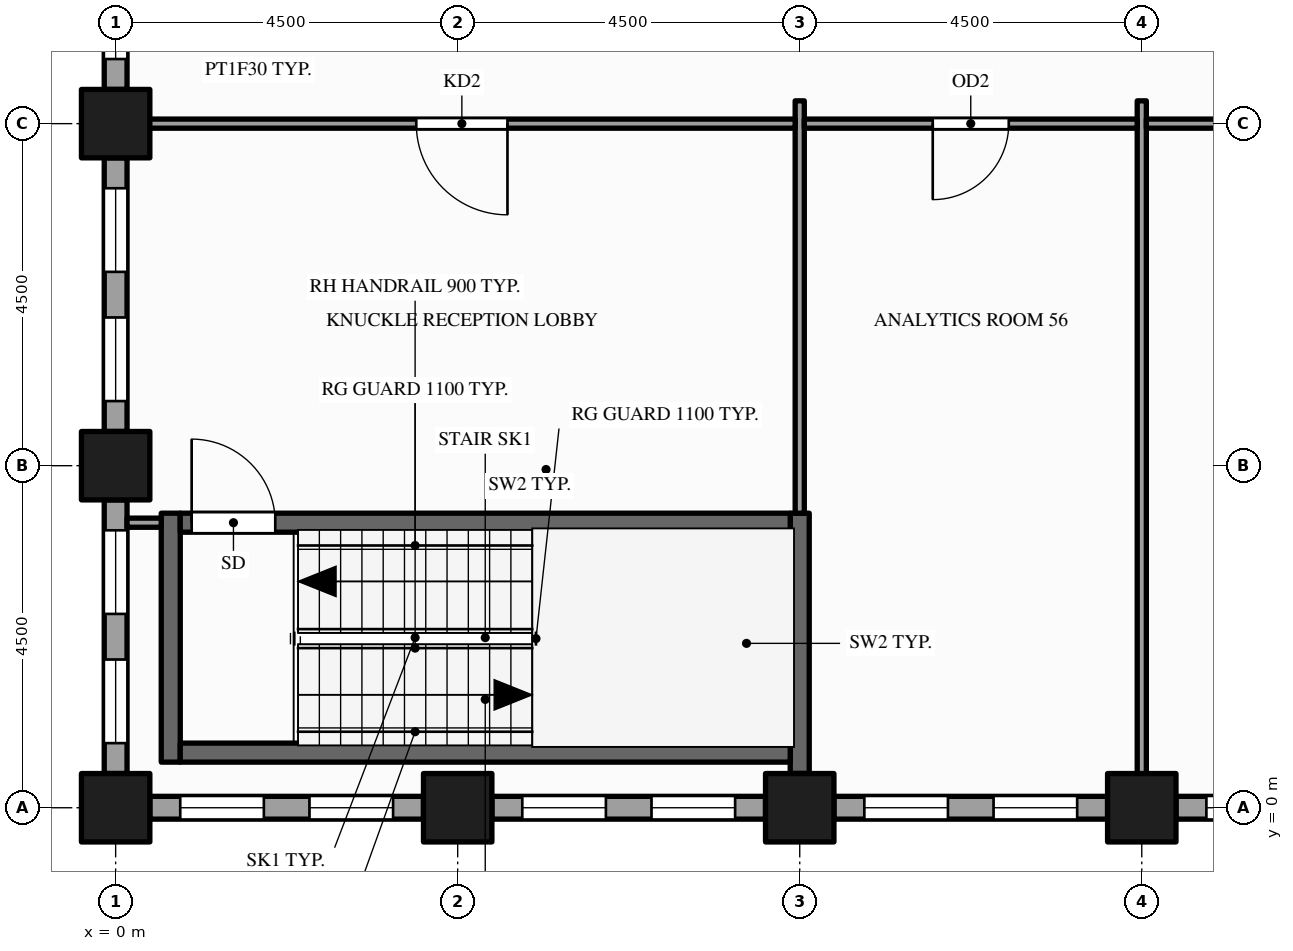
"""IFC4 building model, lengths in metres.
Left out: names, types, materials, properties, quantities, classifications, styles, units other than length and angle.
Written with IfcOpenShell. Run it as: python <this file> out.ifc"""

import sys

from ifc_helpers import new_model, si_unit, direction, frame, frame_2d, origin, origin_2d, place, context, subcontext, project, spatial, rectangle, hollow_rectangle, extrude, element, fill, save


model = new_model("IFC4")
c1 = context("Model", 3, precision=1e-05, world=origin(), true_north=direction((0.0, 1.0)))
c2 = subcontext(c1, "Body", "Model", "MODEL_VIEW")
j1 = project(units=[si_unit("LENGTHUNIT", "METRE"), si_unit("PLANEANGLEUNIT", "RADIAN")], contexts=[c1])
p1 = place(None, origin())
s1 = spatial("IfcSite", under=j1, at=p1, CompositionType="ELEMENT")
p2 = place(p1, origin())
s2 = spatial("IfcBuilding", under=s1, at=p2, CompositionType="ELEMENT")
p3 = place(p2, frame((0.0, 0.0, 147.0)))
s3 = spatial("IfcBuildingStorey", under=s2, at=p3, CompositionType="ELEMENT", Elevation=147.0)
for number, where, z_axis, x_axis in (
    (1, (0.0, 0.0, -0.15), (0.0, 0.0, 1.0), (1.0, 0.0, 0.0)),
    (2, (0.0, 4.5, -0.15), (0.0, 0.0, 1.0), (1.0, 0.0, 0.0)),
    (3, (0.0, 9.0, -0.15), (0.0, 0.0, 1.0), (1.0, 0.0, 0.0)),
    (4, (4.5, 0.0, -0.15), (0.0, 0.0, 1.0), (1.0, 0.0, 0.0)),
    (5, (9.0, 0.0, -0.15), (0.0, 0.0, 1.0), (1.0, 0.0, 0.0)),
    (6, (13.5, 0.0, -0.15), (0.0, 0.0, 1.0), (1.0, 0.0, 0.0)),
):
    element("IfcColumn", number, at=place(p3, frame(where, z_axis=z_axis, x_axis=x_axis)), inside=s3, PredefinedType="COLUMN", context=c2, shape_type="SweptSolid", body=[
        extrude(hollow_rectangle(XDim=0.9, YDim=0.9, WallThickness=0.045, at=origin_2d()), origin(), (0.0, 0.0, 1.0), 4.0),
    ])
p4 = place(p3, frame((0.0, 13.05, 0.0), z_axis=(0.0, 0.0, 1.0), x_axis=(0.0, -1.0, 0.0)))
e7 = element("IfcWall", 7, at=p4, inside=s3, PredefinedType="STANDARD", context=c2, shape_type="SweptSolid", body=[
    extrude(rectangle(XDim=3.6, YDim=0.3, at=frame_2d((1.8, 0.0))), origin(), (0.0, 0.0, 1.0), 3.149),
])
p5 = place(p4, frame((0.4, 0.0, 0.9)))
e8 = element("IfcOpeningElement", 8, at=p5, cuts=e7, PredefinedType="OPENING", context=c2, shape_type="SweptSolid", body=[
    extrude(rectangle(XDim=1.1, YDim=2.0, at=frame_2d((0.55, 1.0))), frame((0.0, 0.16, 0.0), z_axis=(0.0, -1.0, 0.0), x_axis=(1.0, 0.0, 0.0)), (0.0, 0.0, 1.0), 0.32),
])
p6 = place(p4, frame((2.1, 0.0, 0.9)))
e9 = element("IfcOpeningElement", 9, at=p6, cuts=e7, PredefinedType="OPENING", context=c2, shape_type="SweptSolid", body=[
    extrude(rectangle(XDim=1.1, YDim=2.0, at=frame_2d((0.55, 1.0))), frame((0.0, 0.16, 0.0), z_axis=(0.0, -1.0, 0.0), x_axis=(1.0, 0.0, 0.0)), (0.0, 0.0, 1.0), 0.32),
])
p7 = place(p3, frame((0.0, 8.55, 0.0), z_axis=(0.0, 0.0, 1.0), x_axis=(0.0, -1.0, 0.0)))
e10 = element("IfcWall", 10, at=p7, inside=s3, PredefinedType="STANDARD", context=c2, shape_type="SweptSolid", body=[
    extrude(rectangle(XDim=3.6, YDim=0.3, at=frame_2d((1.8, 0.0))), origin(), (0.0, 0.0, 1.0), 3.149),
])
p8 = place(p7, frame((0.4, 0.0, 0.9)))
e11 = element("IfcOpeningElement", 11, at=p8, cuts=e10, PredefinedType="OPENING", context=c2, shape_type="SweptSolid", body=[
    extrude(rectangle(XDim=1.1, YDim=2.0, at=frame_2d((0.55, 1.0))), frame((0.0, 0.16, 0.0), z_axis=(0.0, -1.0, 0.0), x_axis=(1.0, 0.0, 0.0)), (0.0, 0.0, 1.0), 0.32),
])
p9 = place(p7, frame((2.1, 0.0, 0.9)))
e12 = element("IfcOpeningElement", 12, at=p9, cuts=e10, PredefinedType="OPENING", context=c2, shape_type="SweptSolid", body=[
    extrude(rectangle(XDim=1.1, YDim=2.0, at=frame_2d((0.55, 1.0))), frame((0.0, 0.16, 0.0), z_axis=(0.0, -1.0, 0.0), x_axis=(1.0, 0.0, 0.0)), (0.0, 0.0, 1.0), 0.32),
])
p10 = place(p3, frame((0.0, 4.05, 0.0), z_axis=(0.0, 0.0, 1.0), x_axis=(0.0, -1.0, 0.0)))
e13 = element("IfcWall", 13, at=p10, inside=s3, PredefinedType="STANDARD", context=c2, shape_type="SweptSolid", body=[
    extrude(rectangle(XDim=3.6, YDim=0.3, at=frame_2d((1.8, 0.0))), origin(), (0.0, 0.0, 1.0), 3.149),
])
p11 = place(p10, frame((0.4, 0.0, 0.9)))
e14 = element("IfcOpeningElement", 14, at=p11, cuts=e13, PredefinedType="OPENING", context=c2, shape_type="SweptSolid", body=[
    extrude(rectangle(XDim=1.1, YDim=2.0, at=frame_2d((0.55, 1.0))), frame((0.0, 0.16, 0.0), z_axis=(0.0, -1.0, 0.0), x_axis=(1.0, 0.0, 0.0)), (0.0, 0.0, 1.0), 0.32),
])
p12 = place(p10, frame((2.1, 0.0, 0.9)))
e15 = element("IfcOpeningElement", 15, at=p12, cuts=e13, PredefinedType="OPENING", context=c2, shape_type="SweptSolid", body=[
    extrude(rectangle(XDim=1.1, YDim=2.0, at=frame_2d((0.55, 1.0))), frame((0.0, 0.16, 0.0), z_axis=(0.0, -1.0, 0.0), x_axis=(1.0, 0.0, 0.0)), (0.0, 0.0, 1.0), 0.32),
])
p13 = place(p3, frame((0.45, 0.0, 0.0), z_axis=(0.0, 0.0, 1.0), x_axis=(1.0, 0.0, 0.0)))
e16 = element("IfcWall", 16, at=p13, inside=s3, PredefinedType="STANDARD", context=c2, shape_type="SweptSolid", body=[
    extrude(rectangle(XDim=3.6, YDim=0.3, at=frame_2d((1.8, 0.0))), origin(), (0.0, 0.0, 1.0), 3.149),
])
p14 = place(p13, frame((0.4, 0.0, 0.9)))
e17 = element("IfcOpeningElement", 17, at=p14, cuts=e16, PredefinedType="OPENING", context=c2, shape_type="SweptSolid", body=[
    extrude(rectangle(XDim=1.1, YDim=2.0, at=frame_2d((0.55, 1.0))), frame((0.0, 0.16, 0.0), z_axis=(0.0, -1.0, 0.0), x_axis=(1.0, 0.0, 0.0)), (0.0, 0.0, 1.0), 0.32),
])
p15 = place(p13, frame((2.1, 0.0, 0.9)))
e18 = element("IfcOpeningElement", 18, at=p15, cuts=e16, PredefinedType="OPENING", context=c2, shape_type="SweptSolid", body=[
    extrude(rectangle(XDim=1.1, YDim=2.0, at=frame_2d((0.55, 1.0))), frame((0.0, 0.16, 0.0), z_axis=(0.0, -1.0, 0.0), x_axis=(1.0, 0.0, 0.0)), (0.0, 0.0, 1.0), 0.32),
])
p16 = place(p3, frame((4.95, 0.0, 0.0), z_axis=(0.0, 0.0, 1.0), x_axis=(1.0, 0.0, 0.0)))
e19 = element("IfcWall", 19, at=p16, inside=s3, PredefinedType="STANDARD", context=c2, shape_type="SweptSolid", body=[
    extrude(rectangle(XDim=3.6, YDim=0.3, at=frame_2d((1.8, 0.0))), origin(), (0.0, 0.0, 1.0), 3.149),
])
p17 = place(p16, frame((0.4, 0.0, 0.9)))
e20 = element("IfcOpeningElement", 20, at=p17, cuts=e19, PredefinedType="OPENING", context=c2, shape_type="SweptSolid", body=[
    extrude(rectangle(XDim=1.1, YDim=2.0, at=frame_2d((0.55, 1.0))), frame((0.0, 0.16, 0.0), z_axis=(0.0, -1.0, 0.0), x_axis=(1.0, 0.0, 0.0)), (0.0, 0.0, 1.0), 0.32),
])
p18 = place(p16, frame((2.1, 0.0, 0.9)))
e21 = element("IfcOpeningElement", 21, at=p18, cuts=e19, PredefinedType="OPENING", context=c2, shape_type="SweptSolid", body=[
    extrude(rectangle(XDim=1.1, YDim=2.0, at=frame_2d((0.55, 1.0))), frame((0.0, 0.16, 0.0), z_axis=(0.0, -1.0, 0.0), x_axis=(1.0, 0.0, 0.0)), (0.0, 0.0, 1.0), 0.32),
])
p19 = place(p3, frame((9.45, 0.0, 0.0), z_axis=(0.0, 0.0, 1.0), x_axis=(1.0, 0.0, 0.0)))
e22 = element("IfcWall", 22, at=p19, inside=s3, PredefinedType="STANDARD", context=c2, shape_type="SweptSolid", body=[
    extrude(rectangle(XDim=3.6, YDim=0.3, at=frame_2d((1.8, 0.0))), origin(), (0.0, 0.0, 1.0), 2.87),
])
p20 = place(p19, frame((0.4, 0.0, 0.9)))
e23 = element("IfcOpeningElement", 23, at=p20, cuts=e22, PredefinedType="OPENING", context=c2, shape_type="SweptSolid", body=[
    extrude(rectangle(XDim=1.1, YDim=1.75, at=frame_2d((0.55, 0.875))), frame((0.0, 0.16, 0.0), z_axis=(0.0, -1.0, 0.0), x_axis=(1.0, 0.0, 0.0)), (0.0, 0.0, 1.0), 0.32),
])
p21 = place(p19, frame((2.1, 0.0, 0.9)))
e24 = element("IfcOpeningElement", 24, at=p21, cuts=e22, PredefinedType="OPENING", context=c2, shape_type="SweptSolid", body=[
    extrude(rectangle(XDim=1.1, YDim=1.75, at=frame_2d((0.55, 0.875))), frame((0.0, 0.16, 0.0), z_axis=(0.0, -1.0, 0.0), x_axis=(1.0, 0.0, 0.0)), (0.0, 0.0, 1.0), 0.32),
])
p22 = place(p3, frame((13.95, 0.0, 0.0), z_axis=(0.0, 0.0, 1.0), x_axis=(1.0, 0.0, 0.0)))
e25 = element("IfcWall", 25, at=p22, inside=s3, PredefinedType="STANDARD", context=c2, shape_type="SweptSolid", body=[
    extrude(rectangle(XDim=3.6, YDim=0.3, at=frame_2d((1.8, 0.0))), origin(), (0.0, 0.0, 1.0), 2.87),
])
p23 = place(p22, frame((0.4, 0.0, 0.9)))
e26 = element("IfcOpeningElement", 26, at=p23, cuts=e25, PredefinedType="OPENING", context=c2, shape_type="SweptSolid", body=[
    extrude(rectangle(XDim=1.1, YDim=1.75, at=frame_2d((0.55, 0.875))), frame((0.0, 0.16, 0.0), z_axis=(0.0, -1.0, 0.0), x_axis=(1.0, 0.0, 0.0)), (0.0, 0.0, 1.0), 0.32),
])
p24 = place(p22, frame((2.1, 0.0, 0.9)))
e27 = element("IfcOpeningElement", 27, at=p24, cuts=e25, PredefinedType="OPENING", context=c2, shape_type="SweptSolid", body=[
    extrude(rectangle(XDim=1.1, YDim=1.75, at=frame_2d((0.55, 0.875))), frame((0.0, 0.16, 0.0), z_axis=(0.0, -1.0, 0.0), x_axis=(1.0, 0.0, 0.0)), (0.0, 0.0, 1.0), 0.32),
])
p25 = place(p3, frame((0.725, 0.6, 0.0), z_axis=(0.0, 0.0, 1.0), x_axis=(0.0, 1.0, 0.0)))
e28 = element("IfcWall", 28, at=p25, inside=s3, PredefinedType="SHEAR", context=c2, shape_type="SweptSolid", body=[
    extrude(rectangle(XDim=3.275, YDim=0.25, at=frame_2d((1.637, 0.0))), origin(), (0.0, 0.0, 1.0), 3.85),
])
p26 = place(p3, frame((9.0, 0.15, 0.0), z_axis=(0.0, 0.0, 1.0), x_axis=(0.0, 1.0, 0.0)))
e29 = element("IfcWall", 29, at=p26, inside=s3, PredefinedType="PARTITIONING", context=c2, shape_type="SweptSolid", body=[
    extrude(rectangle(XDim=0.3, YDim=0.12, at=frame_2d((0.15, 0.0))), origin(), (0.0, 0.0, 1.0), 3.85),
])
p27 = place(p3, frame((9.0, 0.45, 0.0), z_axis=(0.0, 0.0, 1.0), x_axis=(0.0, 1.0, 0.0)))
e30 = element("IfcWall", 30, at=p27, inside=s3, PredefinedType="SHEAR", context=c2, shape_type="SweptSolid", body=[
    extrude(rectangle(XDim=3.425, YDim=0.25, at=frame_2d((1.712, 0.0))), origin(), (0.0, 0.0, 1.0), 3.85),
])
p28 = place(p3, frame((9.0, 3.875, 0.0), z_axis=(0.0, 0.0, 1.0), x_axis=(0.0, 1.0, 0.0)))
e31 = element("IfcWall", 31, at=p28, inside=s3, PredefinedType="PARTITIONING", context=c2, shape_type="SweptSolid", body=[
    extrude(rectangle(XDim=5.425, YDim=0.12, at=frame_2d((2.712, 0.0))), origin(), (0.0, 0.0, 1.0), 2.87),
])
p29 = place(p3, frame((13.5, 0.15, 0.0), z_axis=(0.0, 0.0, 1.0), x_axis=(0.0, 1.0, 0.0)))
e32 = element("IfcWall", 32, at=p29, inside=s3, PredefinedType="PARTITIONING", context=c2, shape_type="SweptSolid", body=[
    extrude(rectangle(XDim=9.15, YDim=0.12, at=frame_2d((4.575, 0.0))), origin(), (0.0, 0.0, 1.0), 2.87),
])
p30 = place(p3, frame((0.85, 0.725, 0.0), z_axis=(0.0, 0.0, 1.0), x_axis=(1.0, 0.0, 0.0)))
e33 = element("IfcWall", 33, at=p30, inside=s3, PredefinedType="SHEAR", context=c2, shape_type="SweptSolid", body=[
    extrude(rectangle(XDim=8.025, YDim=0.25, at=frame_2d((4.012, 0.0))), origin(), (0.0, 0.0, 1.0), 3.85),
])
p31 = place(p3, frame((0.15, 3.75, 0.0), z_axis=(0.0, 0.0, 1.0), x_axis=(1.0, 0.0, 0.0)))
e34 = element("IfcWall", 34, at=p31, inside=s3, PredefinedType="PARTITIONING", context=c2, shape_type="SweptSolid", body=[
    extrude(rectangle(XDim=0.45, YDim=0.12, at=frame_2d((0.225, 0.0))), origin(), (0.0, 0.0, 1.0), 3.85),
])
p32 = place(p3, frame((0.85, 3.75, 0.0), z_axis=(0.0, 0.0, 1.0), x_axis=(1.0, 0.0, 0.0)))
e35 = element("IfcWall", 35, at=p32, inside=s3, PredefinedType="SHEAR", context=c2, shape_type="SweptSolid", body=[
    extrude(rectangle(XDim=8.025, YDim=0.25, at=frame_2d((4.012, 0.0))), origin(), (0.0, 0.0, 1.0), 3.85),
])
p33 = place(p32, frame((0.15, 0.0, 0.0)))
e36 = element("IfcOpeningElement", 36, at=p33, cuts=e35, PredefinedType="OPENING", context=c2, shape_type="SweptSolid", body=[
    extrude(rectangle(XDim=1.1, YDim=2.1, at=frame_2d((0.55, 1.05))), frame((0.0, 0.135, 0.0), z_axis=(0.0, -1.0, 0.0), x_axis=(1.0, 0.0, 0.0)), (0.0, 0.0, 1.0), 0.27),
])
p34 = place(p3, frame((0.15, 9.0, 0.0), z_axis=(0.0, 0.0, 1.0), x_axis=(1.0, 0.0, 0.0)))
e37 = element("IfcWall", 37, at=p34, inside=s3, PredefinedType="PARTITIONING", context=c2, shape_type="SweptSolid", body=[
    extrude(rectangle(XDim=8.79, YDim=0.12, at=frame_2d((4.395, 0.0))), origin(), (0.0, 0.0, 1.0), 2.87),
])
p35 = place(p34, frame((3.805, 0.0, 0.0)))
e38 = element("IfcOpeningElement", 38, at=p35, cuts=e37, PredefinedType="OPENING", context=c2, shape_type="SweptSolid", body=[
    extrude(rectangle(XDim=1.2, YDim=2.1, at=frame_2d((0.6, 1.05))), frame((0.0, 0.07, 0.0), z_axis=(0.0, -1.0, 0.0), x_axis=(1.0, 0.0, 0.0)), (0.0, 0.0, 1.0), 0.14),
])
p36 = place(p3, frame((9.06, 9.0, 0.0), z_axis=(0.0, 0.0, 1.0), x_axis=(1.0, 0.0, 0.0)))
e39 = element("IfcWall", 39, at=p36, inside=s3, PredefinedType="PARTITIONING", context=c2, shape_type="SweptSolid", body=[
    extrude(rectangle(XDim=4.38, YDim=0.12, at=frame_2d((2.19, 0.0))), origin(), (0.0, 0.0, 1.0), 2.87),
])
p37 = place(p36, frame((1.69, 0.0, 0.0)))
e40 = element("IfcOpeningElement", 40, at=p37, cuts=e39, PredefinedType="OPENING", context=c2, shape_type="SweptSolid", body=[
    extrude(rectangle(XDim=1.0, YDim=2.1, at=frame_2d((0.5, 1.05))), frame((0.0, 0.07, 0.0), z_axis=(0.0, -1.0, 0.0), x_axis=(1.0, 0.0, 0.0)), (0.0, 0.0, 1.0), 0.14),
])
p38 = place(p3, frame((13.56, 9.0, 0.0), z_axis=(0.0, 0.0, 1.0), x_axis=(1.0, 0.0, 0.0)))
e41 = element("IfcWall", 41, at=p38, inside=s3, PredefinedType="PARTITIONING", context=c2, shape_type="SweptSolid", body=[
    extrude(rectangle(XDim=4.38, YDim=0.12, at=frame_2d((2.19, 0.0))), origin(), (0.0, 0.0, 1.0), 2.87),
])
p39 = place(p38, frame((1.69, 0.0, 0.0)))
e42 = element("IfcOpeningElement", 42, at=p39, cuts=e41, PredefinedType="OPENING", context=c2, shape_type="SweptSolid", body=[
    extrude(rectangle(XDim=1.0, YDim=2.1, at=frame_2d((0.5, 1.05))), frame((0.0, 0.07, 0.0), z_axis=(0.0, -1.0, 0.0), x_axis=(1.0, 0.0, 0.0)), (0.0, 0.0, 1.0), 0.14),
])
p40 = place(p6, origin())
e43 = element("IfcWindow", 43, at=p40, inside=s3, PartitioningType="SINGLE_PANEL", PredefinedType="WINDOW", context=c2, shape_type="SweptSolid", body=[
    extrude(rectangle(XDim=1.1, YDim=2.0, at=frame_2d((0.55, 1.0))), frame((0.0, 0.03, 0.0), z_axis=(0.0, -1.0, 0.0), x_axis=(1.0, 0.0, 0.0)), (0.0, 0.0, 1.0), 0.06),
])
fill(e9, e43)
p41 = place(p8, origin())
e44 = element("IfcWindow", 44, at=p41, inside=s3, PartitioningType="SINGLE_PANEL", PredefinedType="WINDOW", context=c2, shape_type="SweptSolid", body=[
    extrude(rectangle(XDim=1.1, YDim=2.0, at=frame_2d((0.55, 1.0))), frame((0.0, 0.03, 0.0), z_axis=(0.0, -1.0, 0.0), x_axis=(1.0, 0.0, 0.0)), (0.0, 0.0, 1.0), 0.06),
])
fill(e11, e44)
p42 = place(p9, origin())
e45 = element("IfcWindow", 45, at=p42, inside=s3, PartitioningType="SINGLE_PANEL", PredefinedType="WINDOW", context=c2, shape_type="SweptSolid", body=[
    extrude(rectangle(XDim=1.1, YDim=2.0, at=frame_2d((0.55, 1.0))), frame((0.0, 0.03, 0.0), z_axis=(0.0, -1.0, 0.0), x_axis=(1.0, 0.0, 0.0)), (0.0, 0.0, 1.0), 0.06),
])
fill(e12, e45)
p43 = place(p11, origin())
e46 = element("IfcWindow", 46, at=p43, inside=s3, PartitioningType="SINGLE_PANEL", PredefinedType="WINDOW", context=c2, shape_type="SweptSolid", body=[
    extrude(rectangle(XDim=1.1, YDim=2.0, at=frame_2d((0.55, 1.0))), frame((0.0, 0.03, 0.0), z_axis=(0.0, -1.0, 0.0), x_axis=(1.0, 0.0, 0.0)), (0.0, 0.0, 1.0), 0.06),
])
fill(e14, e46)
p44 = place(p12, origin())
e47 = element("IfcWindow", 47, at=p44, inside=s3, PartitioningType="SINGLE_PANEL", PredefinedType="WINDOW", context=c2, shape_type="SweptSolid", body=[
    extrude(rectangle(XDim=1.1, YDim=2.0, at=frame_2d((0.55, 1.0))), frame((0.0, 0.03, 0.0), z_axis=(0.0, -1.0, 0.0), x_axis=(1.0, 0.0, 0.0)), (0.0, 0.0, 1.0), 0.06),
])
fill(e15, e47)
p45 = place(p14, origin())
e48 = element("IfcWindow", 48, at=p45, inside=s3, PartitioningType="SINGLE_PANEL", PredefinedType="WINDOW", context=c2, shape_type="SweptSolid", body=[
    extrude(rectangle(XDim=1.1, YDim=2.0, at=frame_2d((0.55, 1.0))), frame((0.0, 0.03, 0.0), z_axis=(0.0, -1.0, 0.0), x_axis=(1.0, 0.0, 0.0)), (0.0, 0.0, 1.0), 0.06),
])
fill(e17, e48)
p46 = place(p15, origin())
e49 = element("IfcWindow", 49, at=p46, inside=s3, PartitioningType="SINGLE_PANEL", PredefinedType="WINDOW", context=c2, shape_type="SweptSolid", body=[
    extrude(rectangle(XDim=1.1, YDim=2.0, at=frame_2d((0.55, 1.0))), frame((0.0, 0.03, 0.0), z_axis=(0.0, -1.0, 0.0), x_axis=(1.0, 0.0, 0.0)), (0.0, 0.0, 1.0), 0.06),
])
fill(e18, e49)
p47 = place(p17, origin())
e50 = element("IfcWindow", 50, at=p47, inside=s3, PartitioningType="SINGLE_PANEL", PredefinedType="WINDOW", context=c2, shape_type="SweptSolid", body=[
    extrude(rectangle(XDim=1.1, YDim=2.0, at=frame_2d((0.55, 1.0))), frame((0.0, 0.03, 0.0), z_axis=(0.0, -1.0, 0.0), x_axis=(1.0, 0.0, 0.0)), (0.0, 0.0, 1.0), 0.06),
])
fill(e20, e50)
p48 = place(p18, origin())
e51 = element("IfcWindow", 51, at=p48, inside=s3, PartitioningType="SINGLE_PANEL", PredefinedType="WINDOW", context=c2, shape_type="SweptSolid", body=[
    extrude(rectangle(XDim=1.1, YDim=2.0, at=frame_2d((0.55, 1.0))), frame((0.0, 0.03, 0.0), z_axis=(0.0, -1.0, 0.0), x_axis=(1.0, 0.0, 0.0)), (0.0, 0.0, 1.0), 0.06),
])
fill(e21, e51)
p49 = place(p20, origin())
e52 = element("IfcWindow", 52, at=p49, inside=s3, PartitioningType="SINGLE_PANEL", PredefinedType="WINDOW", context=c2, shape_type="SweptSolid", body=[
    extrude(rectangle(XDim=1.1, YDim=1.75, at=frame_2d((0.55, 0.875))), frame((0.0, 0.03, 0.0), z_axis=(0.0, -1.0, 0.0), x_axis=(1.0, 0.0, 0.0)), (0.0, 0.0, 1.0), 0.06),
])
fill(e23, e52)
p50 = place(p21, origin())
e53 = element("IfcWindow", 53, at=p50, inside=s3, PartitioningType="SINGLE_PANEL", PredefinedType="WINDOW", context=c2, shape_type="SweptSolid", body=[
    extrude(rectangle(XDim=1.1, YDim=1.75, at=frame_2d((0.55, 0.875))), frame((0.0, 0.03, 0.0), z_axis=(0.0, -1.0, 0.0), x_axis=(1.0, 0.0, 0.0)), (0.0, 0.0, 1.0), 0.06),
])
fill(e24, e53)
p51 = place(p23, origin())
e54 = element("IfcWindow", 54, at=p51, inside=s3, PartitioningType="SINGLE_PANEL", PredefinedType="WINDOW", context=c2, shape_type="SweptSolid", body=[
    extrude(rectangle(XDim=1.1, YDim=1.75, at=frame_2d((0.55, 0.875))), frame((0.0, 0.03, 0.0), z_axis=(0.0, -1.0, 0.0), x_axis=(1.0, 0.0, 0.0)), (0.0, 0.0, 1.0), 0.06),
])
fill(e26, e54)
p52 = place(p33, origin())
e55 = element("IfcDoor", 55, at=p52, inside=s3, OperationType="SINGLE_SWING_LEFT", PredefinedType="DOOR", context=c2, shape_type="SweptSolid", body=[
    extrude(rectangle(XDim=1.1, YDim=2.1, at=frame_2d((0.55, 1.05))), frame((0.0, 0.025, 0.0), z_axis=(0.0, -1.0, 0.0), x_axis=(1.0, 0.0, 0.0)), (0.0, 0.0, 1.0), 0.05),
])
fill(e36, e55)
p53 = place(p35, origin())
e56 = element("IfcDoor", 56, at=p53, inside=s3, OperationType="SINGLE_SWING_RIGHT", PredefinedType="DOOR", context=c2, shape_type="SweptSolid", body=[
    extrude(rectangle(XDim=1.2, YDim=2.1, at=frame_2d((0.6, 1.05))), frame((0.0, 0.025, 0.0), z_axis=(0.0, -1.0, 0.0), x_axis=(1.0, 0.0, 0.0)), (0.0, 0.0, 1.0), 0.05),
])
fill(e38, e56)
p54 = place(p37, origin())
e57 = element("IfcDoor", 57, at=p54, inside=s3, OperationType="SINGLE_SWING_LEFT", PredefinedType="DOOR", context=c2, shape_type="SweptSolid", body=[
    extrude(rectangle(XDim=1.0, YDim=2.1, at=frame_2d((0.5, 1.05))), frame((0.0, 0.025, 0.0), z_axis=(0.0, -1.0, 0.0), x_axis=(1.0, 0.0, 0.0)), (0.0, 0.0, 1.0), 0.05),
])
fill(e40, e57)
save(model, sys.argv[1])
